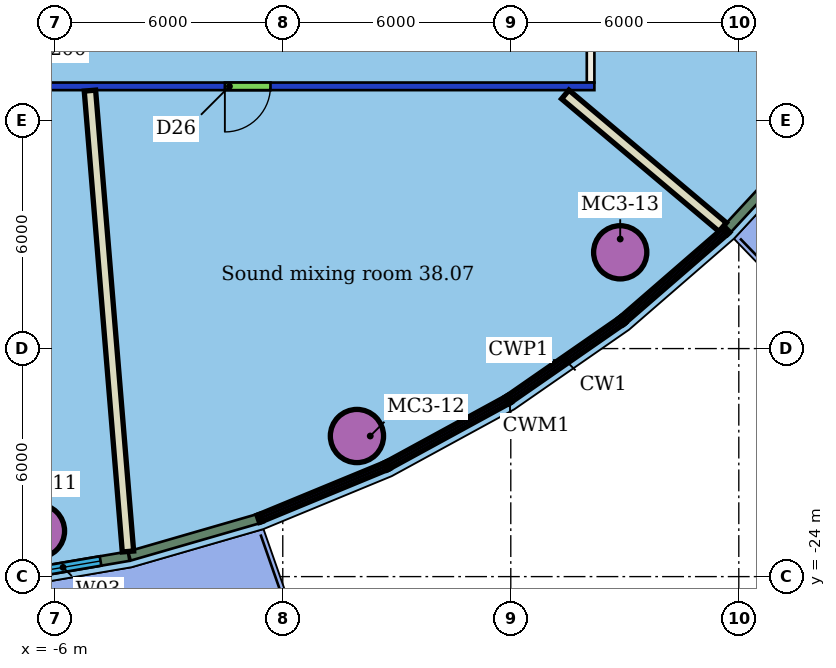
"""IFC4 building model, lengths in metres.
Left out: names, types, materials, properties, quantities, classifications, styles, units other than length and angle.
Written with IfcOpenShell. Run it as: python <this file> out.ifc"""

import sys

from ifc_helpers import new_model, si_unit, direction, frame, frame_2d, origin, origin_2d, place, context, subcontext, project, spatial, rectangle, hollow_circle, extrude, element, fill, save


model = new_model("IFC4")
c1 = context("Model", 3, precision=1e-05, world=origin(), true_north=direction((0.0, 1.0)))
c2 = subcontext(c1, "Body", "Model", "MODEL_VIEW")
j1 = project(units=[si_unit("LENGTHUNIT", "METRE"), si_unit("PLANEANGLEUNIT", "RADIAN")], contexts=[c1])
p1 = place(None, origin())
s1 = spatial("IfcSite", under=j1, at=p1, CompositionType="ELEMENT")
p2 = place(p1, origin())
s2 = spatial("IfcBuilding", under=s1, at=p2, CompositionType="ELEMENT")
p3 = place(p2, frame((0.0, 0.0, 161.4)))
s3 = spatial("IfcBuildingStorey", under=s2, at=p3, CompositionType="ELEMENT", Elevation=161.4)
for number, where, z_axis, x_axis in (
    (1, (-6.442, -22.8, 0.0), (0.0, 0.0, 1.0), (1.0, 0.0, 0.0)),
    (2, (1.952, -20.301, 0.0), (0.0, 0.0, 1.0), (1.0, 0.0, 0.0)),
    (3, (8.879, -15.467, 0.0), (0.0, 0.0, 1.0), (1.0, 0.0, 0.0)),
):
    element("IfcColumn", number, at=place(p3, frame(where, z_axis=z_axis, x_axis=x_axis)), inside=s3, PredefinedType="COLUMN", context=c2, shape_type="SweptSolid", body=[
        extrude(hollow_circle(Radius=0.7, WallThickness=0.05, at=origin_2d()), origin(), (0.0, 0.0, 1.0), 3.45),
    ])
p4 = place(p3, frame((8.2, -11.1, 0.0), z_axis=(0.0, 0.0, 1.0), x_axis=(-1.0, 0.0, 0.0)))
e4 = element("IfcWall", 4, at=p4, inside=s3, PredefinedType="PARTITIONING", context=c2, shape_type="SweptSolid", body=[
    extrude(rectangle(XDim=28.4, YDim=0.2, at=frame_2d((14.2, 0.0))), origin(), (0.0, 0.0, 1.0), 3.05),
])
p5 = place(p4, frame((24.868, 0.0, 0.0)))
e5 = element("IfcOpeningElement", 5, at=p5, cuts=e4, PredefinedType="OPENING", context=c2, shape_type="SweptSolid", body=[
    extrude(rectangle(XDim=1.0, YDim=2.1, at=frame_2d((0.5, 1.05))), frame((0.0, 0.11, 0.0), z_axis=(0.0, -1.0, 0.0), x_axis=(1.0, 0.0, 0.0)), (0.0, 0.0, 1.0), 0.22),
])
p6 = place(p4, frame((18.971, 0.0, 0.0)))
e6 = element("IfcOpeningElement", 6, at=p6, cuts=e4, PredefinedType="OPENING", context=c2, shape_type="SweptSolid", body=[
    extrude(rectangle(XDim=1.8, YDim=2.4, at=frame_2d((0.9, 1.2))), frame((0.0, 0.11, 0.0), z_axis=(0.0, -1.0, 0.0), x_axis=(1.0, 0.0, 0.0)), (0.0, 0.0, 1.0), 0.22),
])
p7 = place(p4, frame((8.524, 0.0, 0.0)))
e7 = element("IfcOpeningElement", 7, at=p7, cuts=e4, PredefinedType="OPENING", context=c2, shape_type="SweptSolid", body=[
    extrude(rectangle(XDim=1.2, YDim=2.1, at=frame_2d((0.6, 1.05))), frame((0.0, 0.11, 0.0), z_axis=(0.0, -1.0, 0.0), x_axis=(1.0, 0.0, 0.0)), (0.0, 0.0, 1.0), 0.22),
])
p8 = place(p3, frame((8.1, 11.0, 0.0), z_axis=(0.0, 0.0, 1.0), x_axis=(0.0, -1.0, 0.0)))
e8 = element("IfcWall", 8, at=p8, inside=s3, PredefinedType="PARTITIONING", context=c2, shape_type="SweptSolid", body=[
    extrude(rectangle(XDim=22.0, YDim=0.2, at=frame_2d((11.0, 0.0))), origin(), (0.0, 0.0, 1.0), 3.45),
])
p9 = place(p8, frame((12.884, 0.0, 0.0)))
e9 = element("IfcOpeningElement", 9, at=p9, cuts=e8, PredefinedType="OPENING", context=c2, shape_type="SweptSolid", body=[
    extrude(rectangle(XDim=1.8, YDim=2.1, at=frame_2d((0.9, 1.05))), frame((0.0, 0.11, 0.0), z_axis=(0.0, -1.0, 0.0), x_axis=(1.0, 0.0, 0.0)), (0.0, 0.0, 1.0), 0.22),
])
p10 = place(p8, frame((5.074, 0.0, 0.0)))
e10 = element("IfcOpeningElement", 10, at=p10, cuts=e8, PredefinedType="OPENING", context=c2, shape_type="SweptSolid", body=[
    extrude(rectangle(XDim=1.8, YDim=2.1, at=frame_2d((0.9, 1.05))), frame((0.0, 0.11, 0.0), z_axis=(0.0, -1.0, 0.0), x_axis=(1.0, 0.0, 0.0)), (0.0, 0.0, 1.0), 0.22),
])
p11 = place(p3, frame((-4.074, -23.339, 0.0), z_axis=(0.0, 0.0, 1.0), x_axis=(-0.082245080322, 0.996612134565, 0.0)))
e11 = element("IfcWall", 11, at=p11, inside=s3, PredefinedType="PARTITIONING", context=c2, shape_type="SweptSolid", body=[
    extrude(rectangle(XDim=12.168, YDim=0.3, at=frame_2d((6.084, 0.0))), origin(), (0.0, 0.0, 1.0), 3.45),
])
p12 = place(p3, frame((11.576, -14.804, 0.0), z_axis=(0.0, 0.0, 1.0), x_axis=(-0.764841059906, 0.644219025706, 0.0)))
e12 = element("IfcWall", 12, at=p12, inside=s3, PredefinedType="PARTITIONING", context=c2, shape_type="SweptSolid", body=[
    extrude(rectangle(XDim=5.416, YDim=0.3, at=frame_2d((2.708, 0.0))), origin(), (0.0, 0.0, 1.0), 3.45),
])
p13 = place(p3, frame((-7.506, -24.051, 0.0), z_axis=(0.0, 0.0, 1.0), x_axis=(0.985772258291, 0.168086450327, 0.0)))
e13 = element("IfcWall", 13, at=p13, inside=s3, PredefinedType="SOLIDWALL", context=c2, shape_type="SweptSolid", body=[
    extrude(rectangle(XDim=3.499, YDim=0.25, at=frame_2d((1.75, 0.0))), origin(), (0.0, 0.0, 1.0), 3.1),
])
p14 = place(p13, frame((0.75, 0.0, 0.9)))
e14 = element("IfcOpeningElement", 14, at=p14, cuts=e13, PredefinedType="OPENING", context=c2, shape_type="SweptSolid", body=[
    extrude(rectangle(XDim=2.0, YDim=2.1, at=frame_2d((1.0, 1.05))), frame((0.0, 0.135, 0.0), z_axis=(0.0, -1.0, 0.0), x_axis=(1.0, 0.0, 0.0)), (0.0, 0.0, 1.0), 0.27),
])
for number, where, z_axis, x_axis in (
    (15, (-4.035, -23.458, 0.0), (0.0, 0.0, 1.0), (0.961, 0.278, 0.0)),
    (16, (11.7, -14.854, 0.0), (0.0, 0.0, 1.0), (0.679, 0.734, 0.0)),
):
    element("IfcWall", number, at=place(p3, frame(where, z_axis=z_axis, x_axis=x_axis)), inside=s3, PredefinedType="SOLIDWALL", context=c2, shape_type="SweptSolid", body=[
        extrude(rectangle(XDim=3.514, YDim=0.25, at=frame_2d((1.757, 0.0))), origin(), (0.0, 0.0, 1.0), 3.1),
    ])
p15 = place(p7, origin())
e17 = element("IfcDoor", 17, at=p15, inside=s3, OperationType="SINGLE_SWING_RIGHT", PredefinedType="DOOR", context=c2, shape_type="SweptSolid", body=[
    extrude(rectangle(XDim=1.2, YDim=2.1, at=frame_2d((0.6, 1.05))), frame((0.0, 0.025, 0.0), z_axis=(0.0, -1.0, 0.0), x_axis=(1.0, 0.0, 0.0)), (0.0, 0.0, 1.0), 0.05),
])
fill(e7, e17)
p16 = place(p14, origin())
e18 = element("IfcWindow", 18, at=p16, inside=s3, PartitioningType="SINGLE_PANEL", PredefinedType="WINDOW", context=c2, shape_type="SweptSolid", body=[
    extrude(rectangle(XDim=2.0, YDim=2.1, at=frame_2d((1.0, 1.05))), frame((0.0, 0.03, 0.0), z_axis=(0.0, -1.0, 0.0), x_axis=(1.0, 0.0, 0.0)), (0.0, 0.0, 1.0), 0.06),
])
fill(e14, e18)
save(model, sys.argv[1])
